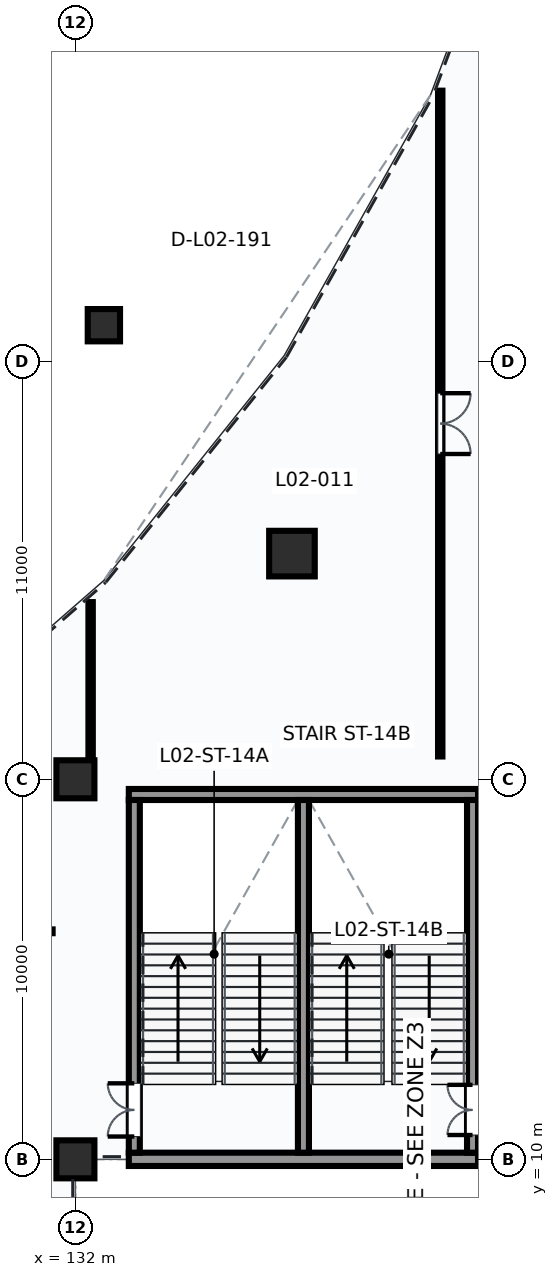
"""IFC4 building model, lengths in metres.
Left out: names, types, materials, properties, quantities, classifications, styles, units other than length and angle.
Written with IfcOpenShell. Run it as: python <this file> out.ifc"""

import sys

from ifc_helpers import new_model, si_unit, direction, frame, frame_2d, origin, origin_2d, place, context, subcontext, project, spatial, rectangle, extrude, element, fill, save


model = new_model("IFC4")
c1 = context("Model", 3, precision=1e-05, world=origin(), true_north=direction((0.0, 1.0)))
c2 = subcontext(c1, "Body", "Model", "MODEL_VIEW")
j1 = project(units=[si_unit("LENGTHUNIT", "METRE"), si_unit("PLANEANGLEUNIT", "RADIAN")], contexts=[c1])
p1 = place(None, origin())
s1 = spatial("IfcSite", under=j1, at=p1, CompositionType="ELEMENT")
p2 = place(p1, origin())
s2 = spatial("IfcBuilding", under=s1, at=p2, CompositionType="ELEMENT")
p3 = place(p2, frame((0.0, 0.0, 10.2)))
s3 = spatial("IfcBuildingStorey", under=s2, at=p3, CompositionType="ELEMENT", Elevation=10.2)
for number, where, z_axis, x_axis in (
    (1, (132.0, 10.0, 0.0), (0.0, 0.0, 1.0), (1.0, 0.0, 0.0)),
    (2, (132.0, 20.0, 0.0), (0.0, 0.0, 1.0), (1.0, 0.0, 0.0)),
):
    element("IfcColumn", number, at=place(p3, frame(where, z_axis=z_axis, x_axis=x_axis)), inside=s3, PredefinedType="COLUMN", context=c2, shape_type="SweptSolid", body=[
        extrude(rectangle(XDim=1.0, YDim=1.0, at=origin_2d()), origin(), (0.0, 0.0, 1.0), 4.5),
    ])
p4 = place(p3, frame((132.749, 31.948, 0.0), z_axis=(0.0, 0.0, 1.0), x_axis=(1.0, 0.0, 0.0)))
e3 = element("IfcColumn", 3, at=p4, inside=s3, PredefinedType="COLUMN", context=c2, shape_type="SweptSolid", body=[
    extrude(rectangle(XDim=0.85, YDim=0.85, at=origin_2d()), origin(), (0.0, 0.0, 1.0), 4.5),
])
p5 = place(p3, frame((137.698, 25.938, 0.0), z_axis=(0.0, 0.0, 1.0), x_axis=(1.0, 0.0, 0.0)))
e4 = element("IfcColumn", 4, at=p5, inside=s3, PredefinedType="COLUMN", context=c2, shape_type="SweptSolid", body=[
    extrude(rectangle(XDim=1.2, YDim=1.2, at=origin_2d()), origin(), (0.0, 0.0, 1.0), 4.5),
])
p6 = place(p3, frame((133.405, 10.0, 0.0), z_axis=(0.0, 0.0, 1.0), x_axis=(1.0, 0.0, 0.0)))
e5 = element("IfcWall", 5, at=p6, inside=s3, PredefinedType="SHEAR", context=c2, shape_type="SweptSolid", body=[
    extrude(rectangle(XDim=9.19, YDim=0.35, at=frame_2d((4.595, 0.0))), origin(), (0.0, 0.0, 1.0), 3.437),
])
p7 = place(p3, frame((133.405, 19.6, 0.0), z_axis=(0.0, 0.0, 1.0), x_axis=(1.0, 0.0, 0.0)))
e6 = element("IfcWall", 6, at=p7, inside=s3, PredefinedType="SHEAR", context=c2, shape_type="SweptSolid", body=[
    extrude(rectangle(XDim=9.19, YDim=0.29, at=frame_2d((4.595, 0.0))), origin(), (0.0, 0.0, 1.0), 4.5),
])
p8 = place(p3, frame((133.55, 10.175, 0.0), z_axis=(0.0, 0.0, 1.0), x_axis=(0.0, 1.0, 0.0)))
e7 = element("IfcWall", 7, at=p8, inside=s3, PredefinedType="SHEAR", context=c2, shape_type="SweptSolid", body=[
    extrude(rectangle(XDim=9.28, YDim=0.29, at=frame_2d((4.64, 0.0))), origin(), (0.0, 0.0, 1.0), 4.5),
])
p9 = place(p8, frame((0.425, 0.0, 0.0)))
e8 = element("IfcOpeningElement", 8, at=p9, cuts=e7, PredefinedType="OPENING", context=c2, shape_type="SweptSolid", body=[
    extrude(rectangle(XDim=1.4, YDim=2.2, at=frame_2d((0.7, 1.1))), frame((0.0, 0.155, 0.0), z_axis=(0.0, -1.0, 0.0), x_axis=(1.0, 0.0, 0.0)), (0.0, 0.0, 1.0), 0.31),
])
p10 = place(p3, frame((142.45, 10.175, 0.0), z_axis=(0.0, 0.0, 1.0), x_axis=(0.0, 1.0, 0.0)))
e9 = element("IfcWall", 9, at=p10, inside=s3, PredefinedType="SHEAR", context=c2, shape_type="SweptSolid", body=[
    extrude(rectangle(XDim=9.28, YDim=0.29, at=frame_2d((4.64, 0.0))), origin(), (0.0, 0.0, 1.0), 4.5),
])
p11 = place(p10, frame((0.465, 0.0, 0.0)))
e10 = element("IfcOpeningElement", 10, at=p11, cuts=e9, PredefinedType="OPENING", context=c2, shape_type="SweptSolid", body=[
    extrude(rectangle(XDim=1.32, YDim=2.2, at=frame_2d((0.66, 1.1))), frame((0.0, 0.155, 0.0), z_axis=(0.0, -1.0, 0.0), x_axis=(1.0, 0.0, 0.0)), (0.0, 0.0, 1.0), 0.31),
])
p12 = place(p3, frame((138.0, 10.175, 0.0), z_axis=(0.0, 0.0, 1.0), x_axis=(0.0, 1.0, 0.0)))
e11 = element("IfcWall", 11, at=p12, inside=s3, PredefinedType="SHEAR", context=c2, shape_type="SweptSolid", body=[
    extrude(rectangle(XDim=9.28, YDim=0.29, at=frame_2d((4.64, 0.0))), origin(), (0.0, 0.0, 1.0), 4.5),
])
p13 = place(p3, frame((132.4, 20.6, 0.0), z_axis=(0.0, 0.0, 1.0), x_axis=(0.0, 1.0, 0.0)))
e12 = element("IfcWall", 12, at=p13, inside=s3, PredefinedType="PARTITIONING", context=c2, shape_type="SweptSolid", body=[
    extrude(rectangle(XDim=4.062, YDim=0.115, at=frame_2d((2.031, 0.0))), origin(), (0.0, 0.0, 1.0), 4.15),
])
p14 = place(p3, frame((141.6, 38.119, 0.0), z_axis=(0.0, 0.0, 1.0), x_axis=(0.0, -1.0, 0.0)))
e13 = element("IfcWall", 13, at=p14, inside=s3, PredefinedType="PARTITIONING", context=c2, shape_type="SweptSolid", body=[
    extrude(rectangle(XDim=17.519, YDim=0.115, at=frame_2d((8.759, 0.0))), origin(), (0.0, 0.0, 1.0), 4.15),
])
p15 = place(p14, frame((7.96, 0.0, 0.0)))
e14 = element("IfcOpeningElement", 14, at=p15, cuts=e13, PredefinedType="OPENING", context=c2, shape_type="SweptSolid", body=[
    extrude(rectangle(XDim=1.6, YDim=2.2, at=frame_2d((0.8, 1.1))), frame((0.0, 0.067, 0.0), z_axis=(0.0, -1.0, 0.0), x_axis=(1.0, 0.0, 0.0)), (0.0, 0.0, 1.0), 0.135),
])
p16 = place(p9, frame((1.4, 0.0, 0.0), z_axis=(0.0, 0.0, 1.0), x_axis=(-1.0, 0.0, 0.0)))
e15 = element("IfcDoor", 15, at=p16, inside=s3, OperationType="DOUBLE_DOOR_SINGLE_SWING", PredefinedType="DOOR", context=c2, shape_type="SweptSolid", body=[
    extrude(rectangle(XDim=1.4, YDim=2.2, at=frame_2d((0.7, 1.1))), frame((0.0, 0.025, 0.0), z_axis=(0.0, -1.0, 0.0), x_axis=(1.0, 0.0, 0.0)), (0.0, 0.0, 1.0), 0.05),
])
fill(e8, e15)
p17 = place(p11, origin())
e16 = element("IfcDoor", 16, at=p17, inside=s3, OperationType="DOUBLE_DOOR_SINGLE_SWING", PredefinedType="DOOR", context=c2, shape_type="SweptSolid", body=[
    extrude(rectangle(XDim=1.32, YDim=2.2, at=frame_2d((0.66, 1.1))), frame((0.0, 0.025, 0.0), z_axis=(0.0, -1.0, 0.0), x_axis=(1.0, 0.0, 0.0)), (0.0, 0.0, 1.0), 0.05),
])
fill(e10, e16)
p18 = place(p15, origin())
e17 = element("IfcDoor", 17, at=p18, inside=s3, OperationType="DOUBLE_DOOR_SINGLE_SWING", PredefinedType="DOOR", context=c2, shape_type="SweptSolid", body=[
    extrude(rectangle(XDim=1.6, YDim=2.2, at=frame_2d((0.8, 1.1))), frame((0.0, 0.025, 0.0), z_axis=(0.0, -1.0, 0.0), x_axis=(1.0, 0.0, 0.0)), (0.0, 0.0, 1.0), 0.05),
])
fill(e14, e17)
save(model, sys.argv[1])
